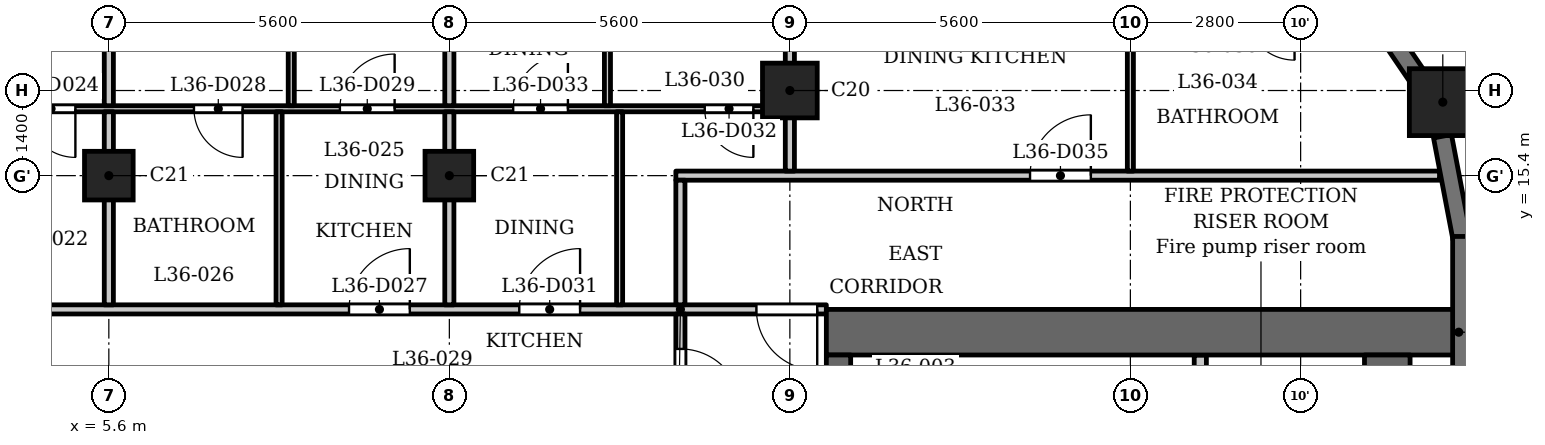
"""IFC4 building model, lengths in metres.
Left out: names, types, materials, properties, quantities, classifications, styles, units other than length and angle.
Written with IfcOpenShell. Run it as: python <this file> out.ifc"""

import sys

from ifc_helpers import new_model, si_unit, direction, frame, frame_2d, origin, origin_2d, place, context, subcontext, project, spatial, rectangle, extrude, element, fill, save


model = new_model("IFC4")
c1 = context("Model", 3, precision=1e-05, world=origin(), true_north=direction((0.0, 1.0)))
c2 = subcontext(c1, "Body", "Model", "MODEL_VIEW")
j1 = project(units=[si_unit("LENGTHUNIT", "METRE"), si_unit("PLANEANGLEUNIT", "RADIAN")], contexts=[c1])
p1 = place(None, origin())
s1 = spatial("IfcSite", under=j1, at=p1, CompositionType="ELEMENT")
p2 = place(p1, origin())
s2 = spatial("IfcBuilding", under=s1, at=p2, CompositionType="ELEMENT")
p3 = place(p2, frame((0.0, 0.0, 143.1)))
s3 = spatial("IfcBuildingStorey", under=s2, at=p3, CompositionType="ELEMENT", Elevation=143.1)
p4 = place(p3, frame((27.538, 16.609, 0.0), z_axis=(0.0, 0.0, 1.0), x_axis=(1.0, 0.0, 0.0)))
e1 = element("IfcColumn", 1, at=p4, inside=s3, PredefinedType="COLUMN", context=c2, shape_type="SweptSolid", body=[
    extrude(rectangle(XDim=1.1, YDim=1.1, at=origin_2d()), origin(), (0.0, 0.0, 1.0), 3.5),
])
p5 = place(p3, frame((16.8, 16.8, 0.0), z_axis=(0.0, 0.0, 1.0), x_axis=(1.0, 0.0, 0.0)))
e2 = element("IfcColumn", 2, at=p5, inside=s3, PredefinedType="COLUMN", context=c2, shape_type="SweptSolid", body=[
    extrude(rectangle(XDim=0.9, YDim=0.9, at=origin_2d()), origin(), (0.0, 0.0, 1.0), 3.5),
])
for number, where, z_axis, x_axis in (
    (3, (5.6, 15.4, 0.0), (0.0, 0.0, 1.0), (1.0, 0.0, 0.0)),
    (4, (11.2, 15.4, 0.0), (0.0, 0.0, 1.0), (1.0, 0.0, 0.0)),
):
    element("IfcColumn", number, at=place(p3, frame(where, z_axis=z_axis, x_axis=x_axis)), inside=s3, PredefinedType="COLUMN", context=c2, shape_type="SweptSolid", body=[
        extrude(rectangle(XDim=0.8, YDim=0.8, at=origin_2d()), origin(), (0.0, 0.0, 1.0), 3.5),
    ])
p6 = place(p3, frame((27.85, 11.75, 0.0), z_axis=(0.0, 0.0, 1.0), x_axis=(0.0, 1.0, 0.0)))
e5 = element("IfcWall", 5, at=p6, inside=s3, PredefinedType="SOLIDWALL", context=c2, shape_type="SweptSolid", body=[
    extrude(rectangle(XDim=2.65, YDim=0.3, at=frame_2d((1.325, 0.0))), origin(), (0.0, 0.0, 1.0), 2.45),
])
p7 = place(p3, frame((27.853, 14.372, 0.0), z_axis=(0.0, 0.0, 1.0), x_axis=(-0.187302784601, 0.982302227871, 0.0)))
e6 = element("IfcWall", 6, at=p7, inside=s3, PredefinedType="SOLIDWALL", context=c2, shape_type="SweptSolid", body=[
    extrude(rectangle(XDim=1.706, YDim=0.3, at=frame_2d((0.853, 0.0))), origin(), (0.0, 0.0, 1.0), 2.45),
])
p8 = place(p3, frame((27.138, 17.002, 0.0), z_axis=(0.0, 0.0, 1.0), x_axis=(-0.562075160946, 0.827086158419, 0.0)))
e7 = element("IfcWall", 7, at=p8, inside=s3, PredefinedType="SOLIDWALL", context=c2, shape_type="SweptSolid", body=[
    extrude(rectangle(XDim=1.706, YDim=0.3, at=frame_2d((0.853, 0.0))), origin(), (0.0, 0.0, 1.0), 2.45),
])
p9 = place(p3, frame((17.4, 12.825, 0.0), z_axis=(0.0, 0.0, 1.0), x_axis=(1.0, 0.0, 0.0)))
e8 = element("IfcWall", 8, at=p9, inside=s3, PredefinedType="SHEAR", context=c2, shape_type="SweptSolid", body=[
    extrude(rectangle(XDim=10.4, YDim=0.75, at=frame_2d((5.2, 0.0))), origin(), (0.0, 0.0, 1.0), 3.2),
])
p10 = place(p3, frame((17.6, -12.45, 0.0), z_axis=(0.0, 0.0, 1.0), x_axis=(0.0, 1.0, 0.0)))
e9 = element("IfcWall", 9, at=p10, inside=s3, PredefinedType="SHEAR", context=c2, shape_type="SweptSolid", body=[
    extrude(rectangle(XDim=24.9, YDim=0.4, at=frame_2d((12.45, 0.0))), origin(), (0.0, 0.0, 1.0), 3.2),
])
p11 = place(p10, frame((8.65, 0.0, 0.0)))
e10 = element("IfcOpeningElement", 10, at=p11, cuts=e9, PredefinedType="OPENING", context=c2, shape_type="SweptSolid", body=[
    extrude(rectangle(XDim=0.9, YDim=2.1, at=frame_2d((0.45, 1.05))), frame((0.0, 0.21, 0.0), z_axis=(0.0, -1.0, 0.0), x_axis=(1.0, 0.0, 0.0)), (0.0, 0.0, 1.0), 0.42),
])
p12 = place(p10, frame((15.6, 0.0, 0.0)))
e11 = element("IfcOpeningElement", 11, at=p12, cuts=e9, PredefinedType="OPENING", context=c2, shape_type="SweptSolid", body=[
    extrude(rectangle(XDim=1.1, YDim=2.1, at=frame_2d((0.55, 1.05))), frame((0.0, 0.21, 0.0), z_axis=(0.0, -1.0, 0.0), x_axis=(1.0, 0.0, 0.0)), (0.0, 0.0, 1.0), 0.42),
])
p13 = place(p10, frame((18.0, 0.0, 0.0)))
e12 = element("IfcOpeningElement", 12, at=p13, cuts=e9, PredefinedType="OPENING", context=c2, shape_type="SweptSolid", body=[
    extrude(rectangle(XDim=1.1, YDim=2.1, at=frame_2d((0.55, 1.05))), frame((0.0, 0.21, 0.0), z_axis=(0.0, -1.0, 0.0), x_axis=(1.0, 0.0, 0.0)), (0.0, 0.0, 1.0), 0.42),
])
p14 = place(p10, frame((23.025, 0.0, 0.0)))
e13 = element("IfcOpeningElement", 13, at=p14, cuts=e9, PredefinedType="OPENING", context=c2, shape_type="SweptSolid", body=[
    extrude(rectangle(XDim=1.1, YDim=2.1, at=frame_2d((0.55, 1.05))), frame((0.0, 0.21, 0.0), z_axis=(0.0, -1.0, 0.0), x_axis=(1.0, 0.0, 0.0)), (0.0, 0.0, 1.0), 0.42),
])
p15 = place(p10, frame((0.775, 0.0, 0.0)))
e14 = element("IfcOpeningElement", 14, at=p15, cuts=e9, PredefinedType="OPENING", context=c2, shape_type="SweptSolid", body=[
    extrude(rectangle(XDim=1.1, YDim=2.1, at=frame_2d((0.55, 1.05))), frame((0.0, 0.21, 0.0), z_axis=(0.0, -1.0, 0.0), x_axis=(1.0, 0.0, 0.0)), (0.0, 0.0, 1.0), 0.42),
])
p16 = place(p10, frame((12.925, 0.0, 0.0)))
e15 = element("IfcOpeningElement", 15, at=p16, cuts=e9, PredefinedType="OPENING", context=c2, shape_type="SweptSolid", body=[
    extrude(rectangle(XDim=1.8, YDim=2.1, at=frame_2d((0.9, 1.05))), frame((0.0, 0.21, 0.0), z_axis=(0.0, -1.0, 0.0), x_axis=(1.0, 0.0, 0.0)), (0.0, 0.0, 1.0), 0.42),
])
p17 = place(p3, frame((26.625, -12.45, 0.0), z_axis=(0.0, 0.0, 1.0), x_axis=(0.0, 1.0, 0.0)))
e16 = element("IfcWall", 16, at=p17, inside=s3, PredefinedType="SHEAR", context=c2, shape_type="SweptSolid", body=[
    extrude(rectangle(XDim=24.9, YDim=0.75, at=frame_2d((12.45, 0.0))), origin(), (0.0, 0.0, 1.0), 3.2),
])
p18 = place(p3, frame((23.55, 9.8, 0.0), z_axis=(0.0, 0.0, 1.0), x_axis=(0.0, 1.0, 0.0)))
e17 = element("IfcWall", 17, at=p18, inside=s3, PredefinedType="PARTITIONING", context=c2, shape_type="SweptSolid", body=[
    extrude(rectangle(XDim=2.65, YDim=0.2, at=frame_2d((1.325, 0.0))), origin(), (0.0, 0.0, 1.0), 3.2),
])
p19 = place(p18, frame((0.875, 0.0, 0.0)))
e18 = element("IfcOpeningElement", 18, at=p19, cuts=e17, PredefinedType="OPENING", context=c2, shape_type="SweptSolid", body=[
    extrude(rectangle(XDim=0.9, YDim=2.1, at=frame_2d((0.45, 1.05))), frame((0.0, 0.11, 0.0), z_axis=(0.0, -1.0, 0.0), x_axis=(1.0, 0.0, 0.0)), (0.0, 0.0, 1.0), 0.22),
])
p20 = place(p3, frame((-17.4, 13.2, 0.0), z_axis=(0.0, 0.0, 1.0), x_axis=(1.0, 0.0, 0.0)))
e19 = element("IfcWall", 19, at=p20, inside=s3, PredefinedType="PARTITIONING", context=c2, shape_type="SweptSolid", body=[
    extrude(rectangle(XDim=34.8, YDim=0.15, at=frame_2d((17.4, 0.0))), origin(), (0.0, 0.0, 1.0), 3.2),
])
p21 = place(p20, frame((0.25, 0.0, 0.0)))
e20 = element("IfcOpeningElement", 20, at=p21, cuts=e19, PredefinedType="OPENING", context=c2, shape_type="SweptSolid", body=[
    extrude(rectangle(XDim=1.0, YDim=2.1, at=frame_2d((0.5, 1.05))), frame((0.0, 0.085, 0.0), z_axis=(0.0, -1.0, 0.0), x_axis=(1.0, 0.0, 0.0)), (0.0, 0.0, 1.0), 0.17),
])
p22 = place(p20, frame((33.65, 0.0, 0.0)))
e21 = element("IfcOpeningElement", 21, at=p22, cuts=e19, PredefinedType="OPENING", context=c2, shape_type="SweptSolid", body=[
    extrude(rectangle(XDim=1.0, YDim=2.1, at=frame_2d((0.5, 1.05))), frame((0.0, 0.085, 0.0), z_axis=(0.0, -1.0, 0.0), x_axis=(1.0, 0.0, 0.0)), (0.0, 0.0, 1.0), 0.17),
])
p23 = place(p20, frame((15.75, 0.0, 0.0)))
e22 = element("IfcOpeningElement", 22, at=p23, cuts=e19, PredefinedType="OPENING", context=c2, shape_type="SweptSolid", body=[
    extrude(rectangle(XDim=1.0, YDim=2.1, at=frame_2d((0.5, 1.05))), frame((0.0, 0.085, 0.0), z_axis=(0.0, -1.0, 0.0), x_axis=(1.0, 0.0, 0.0)), (0.0, 0.0, 1.0), 0.17),
])
p24 = place(p20, frame((19.35, 0.0, 0.0)))
e23 = element("IfcOpeningElement", 23, at=p24, cuts=e19, PredefinedType="OPENING", context=c2, shape_type="SweptSolid", body=[
    extrude(rectangle(XDim=1.0, YDim=2.1, at=frame_2d((0.5, 1.05))), frame((0.0, 0.085, 0.0), z_axis=(0.0, -1.0, 0.0), x_axis=(1.0, 0.0, 0.0)), (0.0, 0.0, 1.0), 0.17),
])
p25 = place(p20, frame((26.95, 0.0, 0.0)))
e24 = element("IfcOpeningElement", 24, at=p25, cuts=e19, PredefinedType="OPENING", context=c2, shape_type="SweptSolid", body=[
    extrude(rectangle(XDim=1.0, YDim=2.1, at=frame_2d((0.5, 1.05))), frame((0.0, 0.085, 0.0), z_axis=(0.0, -1.0, 0.0), x_axis=(1.0, 0.0, 0.0)), (0.0, 0.0, 1.0), 0.17),
])
p26 = place(p20, frame((29.75, 0.0, 0.0)))
e25 = element("IfcOpeningElement", 25, at=p26, cuts=e19, PredefinedType="OPENING", context=c2, shape_type="SweptSolid", body=[
    extrude(rectangle(XDim=1.0, YDim=2.1, at=frame_2d((0.5, 1.05))), frame((0.0, 0.085, 0.0), z_axis=(0.0, -1.0, 0.0), x_axis=(1.0, 0.0, 0.0)), (0.0, 0.0, 1.0), 0.17),
])
p27 = place(p3, frame((14.925, 15.4, 0.0), z_axis=(0.0, 0.0, 1.0), x_axis=(1.0, 0.0, 0.0)))
e26 = element("IfcWall", 26, at=p27, inside=s3, PredefinedType="PARTITIONING", context=c2, shape_type="SweptSolid", body=[
    extrude(rectangle(XDim=12.559, YDim=0.15, at=frame_2d((6.279, 0.0))), origin(), (0.0, 0.0, 1.0), 3.2),
])
p28 = place(p27, frame((5.825, 0.0, 0.0)))
e27 = element("IfcOpeningElement", 27, at=p28, cuts=e26, PredefinedType="OPENING", context=c2, shape_type="SweptSolid", body=[
    extrude(rectangle(XDim=1.0, YDim=2.1, at=frame_2d((0.5, 1.05))), frame((0.0, 0.085, 0.0), z_axis=(0.0, -1.0, 0.0), x_axis=(1.0, 0.0, 0.0)), (0.0, 0.0, 1.0), 0.17),
])
p29 = place(p3, frame((-16.725, 16.5, 0.0), z_axis=(0.0, 0.0, 1.0), x_axis=(1.0, 0.0, 0.0)))
e28 = element("IfcWall", 28, at=p29, inside=s3, PredefinedType="PARTITIONING", context=c2, shape_type="SweptSolid", body=[
    extrude(rectangle(XDim=33.45, YDim=0.1, at=frame_2d((16.725, 0.0))), origin(), (0.0, 0.0, 1.0), 3.2),
])
p30 = place(p29, frame((9.675, 0.0, 0.0)))
e29 = element("IfcOpeningElement", 29, at=p30, cuts=e28, PredefinedType="OPENING", context=c2, shape_type="SweptSolid", body=[
    extrude(rectangle(XDim=0.8, YDim=2.1, at=frame_2d((0.4, 1.05))), frame((0.0, 0.06, 0.0), z_axis=(0.0, -1.0, 0.0), x_axis=(1.0, 0.0, 0.0)), (0.0, 0.0, 1.0), 0.12),
])
p31 = place(p29, frame((3.975, 0.0, 0.0)))
e30 = element("IfcOpeningElement", 30, at=p31, cuts=e28, PredefinedType="OPENING", context=c2, shape_type="SweptSolid", body=[
    extrude(rectangle(XDim=0.9, YDim=2.1, at=frame_2d((0.45, 1.05))), frame((0.0, 0.06, 0.0), z_axis=(0.0, -1.0, 0.0), x_axis=(1.0, 0.0, 0.0)), (0.0, 0.0, 1.0), 0.12),
])
p32 = place(p29, frame((12.025, 0.0, 0.0)))
e31 = element("IfcOpeningElement", 31, at=p32, cuts=e28, PredefinedType="OPENING", context=c2, shape_type="SweptSolid", body=[
    extrude(rectangle(XDim=0.8, YDim=2.1, at=frame_2d((0.4, 1.05))), frame((0.0, 0.06, 0.0), z_axis=(0.0, -1.0, 0.0), x_axis=(1.0, 0.0, 0.0)), (0.0, 0.0, 1.0), 0.12),
])
p33 = place(p29, frame((15.175, 0.0, 0.0)))
e32 = element("IfcOpeningElement", 32, at=p33, cuts=e28, PredefinedType="OPENING", context=c2, shape_type="SweptSolid", body=[
    extrude(rectangle(XDim=0.9, YDim=2.1, at=frame_2d((0.45, 1.05))), frame((0.0, 0.06, 0.0), z_axis=(0.0, -1.0, 0.0), x_axis=(1.0, 0.0, 0.0)), (0.0, 0.0, 1.0), 0.12),
])
p34 = place(p29, frame((20.975, 0.0, 0.0)))
e33 = element("IfcOpeningElement", 33, at=p34, cuts=e28, PredefinedType="OPENING", context=c2, shape_type="SweptSolid", body=[
    extrude(rectangle(XDim=0.8, YDim=2.1, at=frame_2d((0.4, 1.05))), frame((0.0, 0.06, 0.0), z_axis=(0.0, -1.0, 0.0), x_axis=(1.0, 0.0, 0.0)), (0.0, 0.0, 1.0), 0.12),
])
p35 = place(p29, frame((18.175, 0.0, 0.0)))
e34 = element("IfcOpeningElement", 34, at=p35, cuts=e28, PredefinedType="OPENING", context=c2, shape_type="SweptSolid", body=[
    extrude(rectangle(XDim=0.9, YDim=2.1, at=frame_2d((0.45, 1.05))), frame((0.0, 0.06, 0.0), z_axis=(0.0, -1.0, 0.0), x_axis=(1.0, 0.0, 0.0)), (0.0, 0.0, 1.0), 0.12),
])
p36 = place(p29, frame((23.725, 0.0, 0.0)))
e35 = element("IfcOpeningElement", 35, at=p36, cuts=e28, PredefinedType="OPENING", context=c2, shape_type="SweptSolid", body=[
    extrude(rectangle(XDim=0.8, YDim=2.1, at=frame_2d((0.4, 1.05))), frame((0.0, 0.06, 0.0), z_axis=(0.0, -1.0, 0.0), x_axis=(1.0, 0.0, 0.0)), (0.0, 0.0, 1.0), 0.12),
])
p37 = place(p29, frame((26.125, 0.0, 0.0)))
e36 = element("IfcOpeningElement", 36, at=p37, cuts=e28, PredefinedType="OPENING", context=c2, shape_type="SweptSolid", body=[
    extrude(rectangle(XDim=0.9, YDim=2.1, at=frame_2d((0.45, 1.05))), frame((0.0, 0.06, 0.0), z_axis=(0.0, -1.0, 0.0), x_axis=(1.0, 0.0, 0.0)), (0.0, 0.0, 1.0), 0.12),
])
p38 = place(p29, frame((32.125, 0.0, 0.0)))
e37 = element("IfcOpeningElement", 37, at=p38, cuts=e28, PredefinedType="OPENING", context=c2, shape_type="SweptSolid", body=[
    extrude(rectangle(XDim=0.8, YDim=2.1, at=frame_2d((0.4, 1.05))), frame((0.0, 0.06, 0.0), z_axis=(0.0, -1.0, 0.0), x_axis=(1.0, 0.0, 0.0)), (0.0, 0.0, 1.0), 0.12),
])
p39 = place(p29, frame((28.975, 0.0, 0.0)))
e38 = element("IfcOpeningElement", 38, at=p39, cuts=e28, PredefinedType="OPENING", context=c2, shape_type="SweptSolid", body=[
    extrude(rectangle(XDim=0.9, YDim=2.1, at=frame_2d((0.45, 1.05))), frame((0.0, 0.06, 0.0), z_axis=(0.0, -1.0, 0.0), x_axis=(1.0, 0.0, 0.0)), (0.0, 0.0, 1.0), 0.12),
])
p40 = place(p3, frame((5.6, 13.275, 0.0), z_axis=(0.0, 0.0, 1.0), x_axis=(0.0, 1.0, 0.0)))
e39 = element("IfcWall", 39, at=p40, inside=s3, PredefinedType="PARTITIONING", context=c2, shape_type="SweptSolid", body=[
    extrude(rectangle(XDim=3.175, YDim=0.15, at=frame_2d((1.587, 0.0))), origin(), (0.0, 0.0, 1.0), 3.2),
])
p41 = place(p3, frame((5.6, 16.55, 0.0), z_axis=(0.0, 0.0, 1.0), x_axis=(0.0, 1.0, 0.0)))
e40 = element("IfcWall", 40, at=p41, inside=s3, PredefinedType="PARTITIONING", context=c2, shape_type="SweptSolid", body=[
    extrude(rectangle(XDim=6.38, YDim=0.15, at=frame_2d((3.19, 0.0))), origin(), (0.0, 0.0, 1.0), 3.2),
])
p42 = place(p3, frame((8.4, 13.275, 0.0), z_axis=(0.0, 0.0, 1.0), x_axis=(0.0, 1.0, 0.0)))
e41 = element("IfcWall", 41, at=p42, inside=s3, PredefinedType="PARTITIONING", context=c2, shape_type="SweptSolid", body=[
    extrude(rectangle(XDim=3.175, YDim=0.1, at=frame_2d((1.587, 0.0))), origin(), (0.0, 0.0, 1.0), 3.2),
])
p43 = place(p3, frame((8.6, 16.55, 0.0), z_axis=(0.0, 0.0, 1.0), x_axis=(0.0, 1.0, 0.0)))
e42 = element("IfcWall", 42, at=p43, inside=s3, PredefinedType="PARTITIONING", context=c2, shape_type="SweptSolid", body=[
    extrude(rectangle(XDim=5.53, YDim=0.1, at=frame_2d((2.765, 0.0))), origin(), (0.0, 0.0, 1.0), 3.2),
])
p44 = place(p43, frame((1.21, 0.0, 0.0)))
e43 = element("IfcOpeningElement", 43, at=p44, cuts=e42, PredefinedType="OPENING", context=c2, shape_type="SweptSolid", body=[
    extrude(rectangle(XDim=0.9, YDim=2.1, at=frame_2d((0.45, 1.05))), frame((0.0, 0.06, 0.0), z_axis=(0.0, -1.0, 0.0), x_axis=(1.0, 0.0, 0.0)), (0.0, 0.0, 1.0), 0.12),
])
p45 = place(p3, frame((11.2, 13.275, 0.0), z_axis=(0.0, 0.0, 1.0), x_axis=(0.0, 1.0, 0.0)))
e44 = element("IfcWall", 44, at=p45, inside=s3, PredefinedType="PARTITIONING", context=c2, shape_type="SweptSolid", body=[
    extrude(rectangle(XDim=3.175, YDim=0.15, at=frame_2d((1.587, 0.0))), origin(), (0.0, 0.0, 1.0), 3.2),
])
p46 = place(p3, frame((11.2, 16.55, 0.0), z_axis=(0.0, 0.0, 1.0), x_axis=(0.0, 1.0, 0.0)))
e45 = element("IfcWall", 45, at=p46, inside=s3, PredefinedType="PARTITIONING", context=c2, shape_type="SweptSolid", body=[
    extrude(rectangle(XDim=6.38, YDim=0.15, at=frame_2d((3.19, 0.0))), origin(), (0.0, 0.0, 1.0), 3.2),
])
p47 = place(p3, frame((13.8, 16.55, 0.0), z_axis=(0.0, 0.0, 1.0), x_axis=(0.0, 1.0, 0.0)))
e46 = element("IfcWall", 46, at=p47, inside=s3, PredefinedType="PARTITIONING", context=c2, shape_type="SweptSolid", body=[
    extrude(rectangle(XDim=5.53, YDim=0.1, at=frame_2d((2.765, 0.0))), origin(), (0.0, 0.0, 1.0), 3.2),
])
p48 = place(p47, frame((4.35, 0.0, 0.0)))
e47 = element("IfcOpeningElement", 47, at=p48, cuts=e46, PredefinedType="OPENING", context=c2, shape_type="SweptSolid", body=[
    extrude(rectangle(XDim=0.9, YDim=2.1, at=frame_2d((0.45, 1.05))), frame((0.0, 0.06, 0.0), z_axis=(0.0, -1.0, 0.0), x_axis=(1.0, 0.0, 0.0)), (0.0, 0.0, 1.0), 0.12),
])
p49 = place(p3, frame((14.0, 13.275, 0.0), z_axis=(0.0, 0.0, 1.0), x_axis=(0.0, 1.0, 0.0)))
e48 = element("IfcWall", 48, at=p49, inside=s3, PredefinedType="PARTITIONING", context=c2, shape_type="SweptSolid", body=[
    extrude(rectangle(XDim=3.175, YDim=0.1, at=frame_2d((1.587, 0.0))), origin(), (0.0, 0.0, 1.0), 3.2),
])
p50 = place(p3, frame((15.0, 6.769, 0.0), z_axis=(0.0, 0.0, 1.0), x_axis=(0.0, 1.0, 0.0)))
e49 = element("IfcWall", 49, at=p50, inside=s3, PredefinedType="PARTITIONING", context=c2, shape_type="SweptSolid", body=[
    extrude(rectangle(XDim=6.356, YDim=0.15, at=frame_2d((3.178, 0.0))), origin(), (0.0, 0.0, 1.0), 3.2),
])
p51 = place(p50, frame((4.781, 0.0, 0.0)))
e50 = element("IfcOpeningElement", 50, at=p51, cuts=e49, PredefinedType="OPENING", context=c2, shape_type="SweptSolid", body=[
    extrude(rectangle(XDim=1.0, YDim=2.1, at=frame_2d((0.5, 1.05))), frame((0.0, 0.085, 0.0), z_axis=(0.0, -1.0, 0.0), x_axis=(1.0, 0.0, 0.0)), (0.0, 0.0, 1.0), 0.17),
])
p52 = place(p3, frame((15.0, 13.275, 0.0), z_axis=(0.0, 0.0, 1.0), x_axis=(0.0, 1.0, 0.0)))
e51 = element("IfcWall", 51, at=p52, inside=s3, PredefinedType="PARTITIONING", context=c2, shape_type="SweptSolid", body=[
    extrude(rectangle(XDim=2.05, YDim=0.15, at=frame_2d((1.025, 0.0))), origin(), (0.0, 0.0, 1.0), 3.2),
])
p53 = place(p3, frame((16.8, 15.475, 0.0), z_axis=(0.0, 0.0, 1.0), x_axis=(0.0, 1.0, 0.0)))
e52 = element("IfcWall", 52, at=p53, inside=s3, PredefinedType="PARTITIONING", context=c2, shape_type="SweptSolid", body=[
    extrude(rectangle(XDim=7.455, YDim=0.15, at=frame_2d((3.728, 0.0))), origin(), (0.0, 0.0, 1.0), 3.2),
])
p54 = place(p3, frame((22.4, 15.475, 0.0), z_axis=(0.0, 0.0, 1.0), x_axis=(0.0, 1.0, 0.0)))
e53 = element("IfcWall", 53, at=p54, inside=s3, PredefinedType="PARTITIONING", context=c2, shape_type="SweptSolid", body=[
    extrude(rectangle(XDim=2.575, YDim=0.1, at=frame_2d((1.288, 0.0))), origin(), (0.0, 0.0, 1.0), 3.2),
])
p55 = place(p51, origin())
e54 = element("IfcDoor", 54, at=p55, inside=s3, OperationType="SINGLE_SWING_LEFT", PredefinedType="DOOR", context=c2, shape_type="SweptSolid", body=[
    extrude(rectangle(XDim=1.0, YDim=2.1, at=frame_2d((0.5, 1.05))), frame((0.0, 0.025, 0.0), z_axis=(0.0, -1.0, 0.0), x_axis=(1.0, 0.0, 0.0)), (0.0, 0.0, 1.0), 0.05),
])
fill(e50, e54)
p56 = place(p22, origin())
e55 = element("IfcDoor", 55, at=p56, inside=s3, OperationType="SINGLE_SWING_RIGHT", PredefinedType="DOOR", context=c2, shape_type="SweptSolid", body=[
    extrude(rectangle(XDim=1.0, YDim=2.1, at=frame_2d((0.5, 1.05))), frame((0.0, 0.025, 0.0), z_axis=(0.0, -1.0, 0.0), x_axis=(1.0, 0.0, 0.0)), (0.0, 0.0, 1.0), 0.05),
])
fill(e21, e55)
p57 = place(p34, origin())
e56 = element("IfcDoor", 56, at=p57, inside=s3, OperationType="SINGLE_SWING_RIGHT", PredefinedType="DOOR", context=c2, shape_type="SweptSolid", body=[
    extrude(rectangle(XDim=0.8, YDim=2.1, at=frame_2d((0.4, 1.05))), frame((0.0, 0.025, 0.0), z_axis=(0.0, -1.0, 0.0), x_axis=(1.0, 0.0, 0.0)), (0.0, 0.0, 1.0), 0.05),
])
fill(e33, e56)
p58 = place(p25, origin())
e57 = element("IfcDoor", 57, at=p58, inside=s3, OperationType="SINGLE_SWING_LEFT", PredefinedType="DOOR", context=c2, shape_type="SweptSolid", body=[
    extrude(rectangle(XDim=1.0, YDim=2.1, at=frame_2d((0.5, 1.05))), frame((0.0, 0.025, 0.0), z_axis=(0.0, -1.0, 0.0), x_axis=(1.0, 0.0, 0.0)), (0.0, 0.0, 1.0), 0.05),
])
fill(e24, e57)
p59 = place(p36, origin())
e58 = element("IfcDoor", 58, at=p59, inside=s3, OperationType="SINGLE_SWING_RIGHT", PredefinedType="DOOR", context=c2, shape_type="SweptSolid", body=[
    extrude(rectangle(XDim=0.8, YDim=2.1, at=frame_2d((0.4, 1.05))), frame((0.0, 0.025, 0.0), z_axis=(0.0, -1.0, 0.0), x_axis=(1.0, 0.0, 0.0)), (0.0, 0.0, 1.0), 0.05),
])
fill(e35, e58)
p60 = place(p37, origin())
e59 = element("IfcDoor", 59, at=p60, inside=s3, OperationType="SINGLE_SWING_LEFT", PredefinedType="DOOR", context=c2, shape_type="SweptSolid", body=[
    extrude(rectangle(XDim=0.9, YDim=2.1, at=frame_2d((0.45, 1.05))), frame((0.0, 0.025, 0.0), z_axis=(0.0, -1.0, 0.0), x_axis=(1.0, 0.0, 0.0)), (0.0, 0.0, 1.0), 0.05),
])
fill(e36, e59)
p61 = place(p26, origin())
e60 = element("IfcDoor", 60, at=p61, inside=s3, OperationType="SINGLE_SWING_LEFT", PredefinedType="DOOR", context=c2, shape_type="SweptSolid", body=[
    extrude(rectangle(XDim=1.0, YDim=2.1, at=frame_2d((0.5, 1.05))), frame((0.0, 0.025, 0.0), z_axis=(0.0, -1.0, 0.0), x_axis=(1.0, 0.0, 0.0)), (0.0, 0.0, 1.0), 0.05),
])
fill(e25, e60)
p62 = place(p38, origin())
e61 = element("IfcDoor", 61, at=p62, inside=s3, OperationType="SINGLE_SWING_RIGHT", PredefinedType="DOOR", context=c2, shape_type="SweptSolid", body=[
    extrude(rectangle(XDim=0.8, YDim=2.1, at=frame_2d((0.4, 1.05))), frame((0.0, 0.025, 0.0), z_axis=(0.0, -1.0, 0.0), x_axis=(1.0, 0.0, 0.0)), (0.0, 0.0, 1.0), 0.05),
])
fill(e37, e61)
p63 = place(p39, origin())
e62 = element("IfcDoor", 62, at=p63, inside=s3, OperationType="SINGLE_SWING_LEFT", PredefinedType="DOOR", context=c2, shape_type="SweptSolid", body=[
    extrude(rectangle(XDim=0.9, YDim=2.1, at=frame_2d((0.45, 1.05))), frame((0.0, 0.025, 0.0), z_axis=(0.0, -1.0, 0.0), x_axis=(1.0, 0.0, 0.0)), (0.0, 0.0, 1.0), 0.05),
])
fill(e38, e62)
p64 = place(p28, origin())
e63 = element("IfcDoor", 63, at=p64, inside=s3, OperationType="SINGLE_SWING_LEFT", PredefinedType="DOOR", context=c2, shape_type="SweptSolid", body=[
    extrude(rectangle(XDim=1.0, YDim=2.1, at=frame_2d((0.5, 1.05))), frame((0.0, 0.025, 0.0), z_axis=(0.0, -1.0, 0.0), x_axis=(1.0, 0.0, 0.0)), (0.0, 0.0, 1.0), 0.05),
])
fill(e27, e63)
save(model, sys.argv[1])
